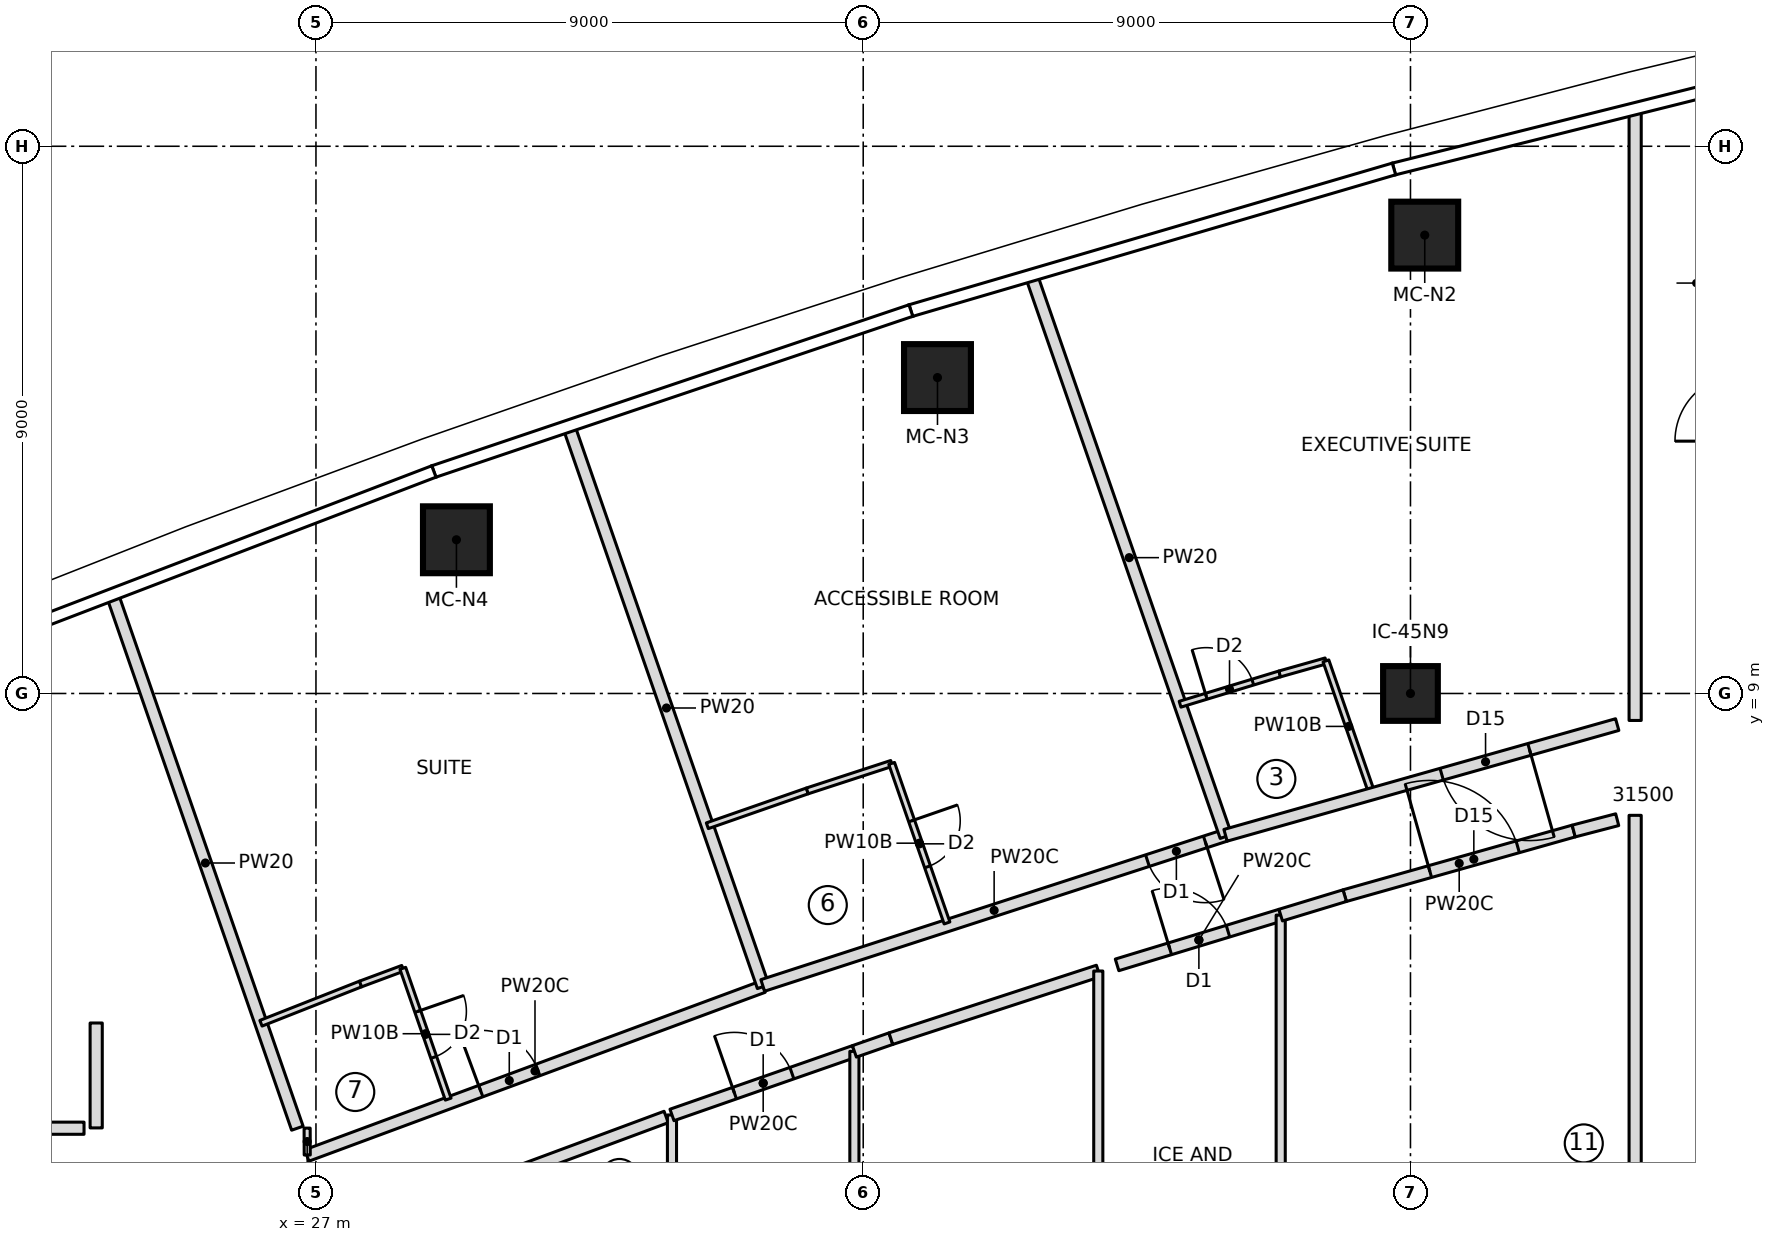
"""IFC4 building model, lengths in metres.
Left out: names, types, materials, properties, quantities, classifications, styles, units other than length and angle.
Written with IfcOpenShell. Run it as: python <this file> out.ifc"""

import sys

from ifc_helpers import new_model, si_unit, direction, frame, frame_2d, origin, origin_2d, place, context, subcontext, project, spatial, rectangle, extrude, element, fill, save


model = new_model("IFC4")
c1 = context("Model", 3, precision=1e-05, world=origin(), true_north=direction((0.0, 1.0)))
c2 = subcontext(c1, "Body", "Model", "MODEL_VIEW")
j1 = project(units=[si_unit("LENGTHUNIT", "METRE"), si_unit("PLANEANGLEUNIT", "RADIAN")], contexts=[c1])
p1 = place(None, origin())
s1 = spatial("IfcSite", under=j1, at=p1, CompositionType="ELEMENT")
p2 = place(p1, origin())
s2 = spatial("IfcBuilding", under=s1, at=p2, CompositionType="ELEMENT")
p3 = place(p2, frame((0.0, 0.0, 299.85)))
s3 = spatial("IfcBuildingStorey", under=s2, at=p3, CompositionType="ELEMENT", Elevation=299.85)
for number, where, z_axis, x_axis in (
    (1, (45.235, 16.539, 0.0), (0.0, 0.0, 1.0), (1.0, 0.0, 0.0)),
    (2, (37.221, 14.196, 0.0), (0.0, 0.0, 1.0), (1.0, 0.0, 0.0)),
    (3, (29.31, 11.528, 0.0), (0.0, 0.0, 1.0), (1.0, 0.0, 0.0)),
):
    element("IfcColumn", number, at=place(p3, frame(where, z_axis=z_axis, x_axis=x_axis)), inside=s3, PredefinedType="COLUMN", context=c2, shape_type="SweptSolid", body=[
        extrude(rectangle(XDim=1.1, YDim=1.1, at=origin_2d()), origin(), (0.0, 0.0, 1.0), 3.55),
    ])
p4 = place(p3, frame((45.0, 9.0, 0.0), z_axis=(0.0, 0.0, 1.0), x_axis=(1.0, 0.0, 0.0)))
e4 = element("IfcColumn", 4, at=p4, inside=s3, PredefinedType="COLUMN", context=c2, shape_type="SweptSolid", body=[
    extrude(rectangle(XDim=0.9, YDim=0.9, at=origin_2d()), origin(), (0.0, 0.0, 1.0), 3.55),
])
p5 = place(p3, frame((13.637, 1.85, 0.0), z_axis=(0.0, 0.0, 1.0), x_axis=(1.0, 0.0, 0.0)))
e5 = element("IfcWall", 5, at=p5, inside=s3, PredefinedType="PARTITIONING", context=c2, shape_type="SweptSolid", body=[
    extrude(rectangle(XDim=9.549, YDim=0.2, at=frame_2d((4.774, 0.0))), origin(), (0.0, 0.0, 1.0), 3.15),
])
p6 = place(p5, frame((4.274, 0.0, 0.0)))
e6 = element("IfcOpeningElement", 6, at=p6, cuts=e5, PredefinedType="OPENING", context=c2, shape_type="SweptSolid", body=[
    extrude(rectangle(XDim=1.0, YDim=2.1, at=frame_2d((0.5, 1.05))), frame((0.0, 0.11, 0.0), z_axis=(0.0, -1.0, 0.0), x_axis=(1.0, 0.0, 0.0)), (0.0, 0.0, 1.0), 0.22),
])
p7 = place(p3, frame((26.694, 1.85, 0.0), z_axis=(0.0, 0.0, 1.0), x_axis=(-0.327714422317, 0.944776829418, 0.0)))
e7 = element("IfcWall", 7, at=p7, inside=s3, PredefinedType="PARTITIONING", context=c2, shape_type="SweptSolid", body=[
    extrude(rectangle(XDim=9.233, YDim=0.2, at=frame_2d((4.617, 0.0))), origin(), (0.0, 0.0, 1.0), 3.15),
])
p8 = place(p3, frame((26.85, 1.401, 0.0), z_axis=(0.0, 0.0, 1.0), x_axis=(0.937815361849, 0.34713447982, 0.0)))
e8 = element("IfcWall", 8, at=p8, inside=s3, PredefinedType="PARTITIONING", context=c2, shape_type="SweptSolid", body=[
    extrude(rectangle(XDim=8.001, YDim=0.2, at=frame_2d((4.001, 0.0))), origin(), (0.0, 0.0, 1.0), 3.15),
])
p9 = place(p8, frame((3.05, 0.0, 0.0)))
e9 = element("IfcOpeningElement", 9, at=p9, cuts=e8, PredefinedType="OPENING", context=c2, shape_type="SweptSolid", body=[
    extrude(rectangle(XDim=1.0, YDim=2.1, at=frame_2d((0.5, 1.05))), frame((0.0, 0.11, 0.0), z_axis=(0.0, -1.0, 0.0), x_axis=(1.0, 0.0, 0.0)), (0.0, 0.0, 1.0), 0.22),
])
p10 = place(p3, frame((26.096, 3.576, 0.0), z_axis=(0.0, 0.0, 1.0), x_axis=(0.930254925629, 0.366913850028, 0.0)))
e10 = element("IfcWall", 10, at=p10, inside=s3, PredefinedType="PARTITIONING", context=c2, shape_type="SweptSolid", body=[
    extrude(rectangle(XDim=1.76, YDim=0.1, at=frame_2d((0.88, 0.0))), origin(), (0.0, 0.0, 1.0), 3.15),
])
p11 = place(p3, frame((27.733, 4.222, 0.0), z_axis=(0.0, 0.0, 1.0), x_axis=(0.937514267289, 0.347946833049, 0.0)))
e11 = element("IfcWall", 11, at=p11, inside=s3, PredefinedType="PARTITIONING", context=c2, shape_type="SweptSolid", body=[
    extrude(rectangle(XDim=0.742, YDim=0.1, at=frame_2d((0.371, 0.0))), origin(), (0.0, 0.0, 1.0), 3.15),
])
p12 = place(p3, frame((28.428, 4.48, 0.0), z_axis=(0.0, 0.0, 1.0), x_axis=(0.327718024288, -0.944775579996, 0.0)))
e12 = element("IfcWall", 12, at=p12, inside=s3, PredefinedType="PARTITIONING", context=c2, shape_type="SweptSolid", body=[
    extrude(rectangle(XDim=2.277, YDim=0.1, at=frame_2d((1.139, 0.0))), origin(), (0.0, 0.0, 1.0), 3.15),
])
p13 = place(p12, frame((0.75, 0.0, 0.0)))
e13 = element("IfcOpeningElement", 13, at=p13, cuts=e12, PredefinedType="OPENING", context=c2, shape_type="SweptSolid", body=[
    extrude(rectangle(XDim=0.8, YDim=2.1, at=frame_2d((0.4, 1.05))), frame((0.0, 0.06, 0.0), z_axis=(0.0, -1.0, 0.0), x_axis=(1.0, 0.0, 0.0)), (0.0, 0.0, 1.0), 0.12),
])
p14 = place(p3, frame((34.354, 4.179, 0.0), z_axis=(0.0, 0.0, 1.0), x_axis=(-0.327696596093, 0.944783012606, 0.0)))
e14 = element("IfcWall", 14, at=p14, inside=s3, PredefinedType="PARTITIONING", context=c2, shape_type="SweptSolid", body=[
    extrude(rectangle(XDim=9.7, YDim=0.2, at=frame_2d((4.85, 0.0))), origin(), (0.0, 0.0, 1.0), 3.15),
])
p15 = place(p3, frame((41.958, 6.667, 0.0), z_axis=(0.0, 0.0, 1.0), x_axis=(-0.95118530316, -0.308620347761, 0.0)))
e15 = element("IfcWall", 15, at=p15, inside=s3, PredefinedType="PARTITIONING", context=c2, shape_type="SweptSolid", body=[
    extrude(rectangle(XDim=8.002, YDim=0.2, at=frame_2d((4.001, 0.0))), origin(), (0.0, 0.0, 1.0), 3.15),
])
p16 = place(p15, frame((0.35, 0.0, 0.0)))
e16 = element("IfcOpeningElement", 16, at=p16, cuts=e15, PredefinedType="OPENING", context=c2, shape_type="SweptSolid", body=[
    extrude(rectangle(XDim=1.0, YDim=2.1, at=frame_2d((0.5, 1.05))), frame((0.0, 0.11, 0.0), z_axis=(0.0, -1.0, 0.0), x_axis=(1.0, 0.0, 0.0)), (0.0, 0.0, 1.0), 0.22),
])
p17 = place(p3, frame((33.437, 6.824, 0.0), z_axis=(0.0, 0.0, 1.0), x_axis=(0.944260018318, 0.329200573825, 0.0)))
e17 = element("IfcWall", 17, at=p17, inside=s3, PredefinedType="PARTITIONING", context=c2, shape_type="SweptSolid", body=[
    extrude(rectangle(XDim=1.74, YDim=0.1, at=frame_2d((0.87, 0.0))), origin(), (0.0, 0.0, 1.0), 3.15),
])
p18 = place(p3, frame((35.08, 7.397, 0.0), z_axis=(0.0, 0.0, 1.0), x_axis=(0.95070411494, 0.310099477322, 0.0)))
e18 = element("IfcWall", 18, at=p18, inside=s3, PredefinedType="PARTITIONING", context=c2, shape_type="SweptSolid", body=[
    extrude(rectangle(XDim=1.46, YDim=0.1, at=frame_2d((0.73, 0.0))), origin(), (0.0, 0.0, 1.0), 3.15),
])
p19 = place(p3, frame((36.468, 7.85, 0.0), z_axis=(0.0, 0.0, 1.0), x_axis=(0.327702248101, -0.944781052197, 0.0)))
e19 = element("IfcWall", 19, at=p19, inside=s3, PredefinedType="PARTITIONING", context=c2, shape_type="SweptSolid", body=[
    extrude(rectangle(XDim=2.777, YDim=0.1, at=frame_2d((1.389, 0.0))), origin(), (0.0, 0.0, 1.0), 3.15),
])
p20 = place(p19, frame((1.0, 0.0, 0.0)))
e20 = element("IfcOpeningElement", 20, at=p20, cuts=e19, PredefinedType="OPENING", context=c2, shape_type="SweptSolid", body=[
    extrude(rectangle(XDim=0.8, YDim=2.1, at=frame_2d((0.4, 1.05))), frame((0.0, 0.06, 0.0), z_axis=(0.0, -1.0, 0.0), x_axis=(1.0, 0.0, 0.0)), (0.0, 0.0, 1.0), 0.12),
])
p21 = place(p3, frame((41.965, 6.648, 0.0), z_axis=(0.0, 0.0, 1.0), x_axis=(-0.327710853631, 0.944778067279, 0.0)))
e21 = element("IfcWall", 21, at=p21, inside=s3, PredefinedType="PARTITIONING", context=c2, shape_type="SweptSolid", body=[
    extrude(rectangle(XDim=9.707, YDim=0.2, at=frame_2d((4.854, 0.0))), origin(), (0.0, 0.0, 1.0), 3.15),
])
p22 = place(p3, frame((41.211, 8.823, 0.0), z_axis=(0.0, 0.0, 1.0), x_axis=(0.95674463014, 0.290929050971, 0.0)))
e22 = element("IfcWall", 22, at=p22, inside=s3, PredefinedType="PARTITIONING", context=c2, shape_type="SweptSolid", body=[
    extrude(rectangle(XDim=1.713, YDim=0.1, at=frame_2d((0.856, 0.0))), origin(), (0.0, 0.0, 1.0), 3.15),
])
p23 = place(p22, frame((0.45, 0.0, 0.0)))
e23 = element("IfcOpeningElement", 23, at=p23, cuts=e22, PredefinedType="OPENING", context=c2, shape_type="SweptSolid", body=[
    extrude(rectangle(XDim=0.8, YDim=2.1, at=frame_2d((0.4, 1.05))), frame((0.0, 0.06, 0.0), z_axis=(0.0, -1.0, 0.0), x_axis=(1.0, 0.0, 0.0)), (0.0, 0.0, 1.0), 0.12),
])
p24 = place(p3, frame((42.85, 9.321, 0.0), z_axis=(0.0, 0.0, 1.0), x_axis=(0.962370937031, 0.271739175603, 0.0)))
e24 = element("IfcWall", 24, at=p24, inside=s3, PredefinedType="PARTITIONING", context=c2, shape_type="SweptSolid", body=[
    extrude(rectangle(XDim=0.79, YDim=0.1, at=frame_2d((0.395, 0.0))), origin(), (0.0, 0.0, 1.0), 3.15),
])
p25 = place(p3, frame((43.61, 9.536, 0.0), z_axis=(0.0, 0.0, 1.0), x_axis=(0.32773175909, -0.944770815639, 0.0)))
e25 = element("IfcWall", 25, at=p25, inside=s3, PredefinedType="PARTITIONING", context=c2, shape_type="SweptSolid", body=[
    extrude(rectangle(XDim=2.281, YDim=0.1, at=frame_2d((1.141, 0.0))), origin(), (0.0, 0.0, 1.0), 3.15),
])
p26 = place(p3, frame((29.092, 0.673, 0.0), z_axis=(0.0, 0.0, 1.0), x_axis=(0.937460178932, 0.348092534992, 0.0)))
e26 = element("IfcWall", 26, at=p26, inside=s3, PredefinedType="PARTITIONING", context=c2, shape_type="SweptSolid", body=[
    extrude(rectangle(XDim=3.913, YDim=0.2, at=frame_2d((1.957, 0.0))), origin(), (0.0, 0.0, 1.0), 3.15),
])
p27 = place(p3, frame((32.855, -2.068, 0.0), z_axis=(0.0, 0.0, 1.0), x_axis=(0.0, 1.0, 0.0)))
e27 = element("IfcWall", 27, at=p27, inside=s3, PredefinedType="PARTITIONING", context=c2, shape_type="SweptSolid", body=[
    extrude(rectangle(XDim=4.136, YDim=0.15, at=frame_2d((2.068, 0.0))), origin(), (0.0, 0.0, 1.0), 3.15),
])
p28 = place(p3, frame((32.855, 2.068, 0.0), z_axis=(0.0, 0.0, 1.0), x_axis=(0.944260188635, 0.329200085296, 0.0)))
e28 = element("IfcWall", 28, at=p28, inside=s3, PredefinedType="PARTITIONING", context=c2, shape_type="SweptSolid", body=[
    extrude(rectangle(XDim=3.177, YDim=0.2, at=frame_2d((1.588, 0.0))), origin(), (0.0, 0.0, 1.0), 3.15),
])
p29 = place(p28, frame((1.088, 0.0, 0.0)))
e29 = element("IfcOpeningElement", 29, at=p29, cuts=e28, PredefinedType="OPENING", context=c2, shape_type="SweptSolid", body=[
    extrude(rectangle(XDim=1.0, YDim=2.1, at=frame_2d((0.5, 1.05))), frame((0.0, 0.11, 0.0), z_axis=(0.0, -1.0, 0.0), x_axis=(1.0, 0.0, 0.0)), (0.0, 0.0, 1.0), 0.22),
])
p30 = place(p3, frame((35.855, -3.114, 0.0), z_axis=(0.0, 0.0, 1.0), x_axis=(0.0, 1.0, 0.0)))
e30 = element("IfcWall", 30, at=p30, inside=s3, PredefinedType="PARTITIONING", context=c2, shape_type="SweptSolid", body=[
    extrude(rectangle(XDim=6.228, YDim=0.15, at=frame_2d((3.114, 0.0))), origin(), (0.0, 0.0, 1.0), 3.15),
])
p31 = place(p3, frame((35.855, 3.114, 0.0), z_axis=(0.0, 0.0, 1.0), x_axis=(0.944289130413, 0.329117058483, 0.0)))
e31 = element("IfcWall", 31, at=p31, inside=s3, PredefinedType="PARTITIONING", context=c2, shape_type="SweptSolid", body=[
    extrude(rectangle(XDim=0.635, YDim=0.2, at=frame_2d((0.317, 0.0))), origin(), (0.0, 0.0, 1.0), 3.15),
])
p32 = place(p3, frame((36.455, 3.323, 0.0), z_axis=(0.0, 0.0, 1.0), x_axis=(0.950718067733, 0.310056697535, 0.0)))
e32 = element("IfcWall", 32, at=p32, inside=s3, PredefinedType="PARTITIONING", context=c2, shape_type="SweptSolid", body=[
    extrude(rectangle(XDim=3.588, YDim=0.2, at=frame_2d((1.794, 0.0))), origin(), (0.0, 0.0, 1.0), 3.15),
])
p33 = place(p3, frame((39.866, -4.435, 0.0), z_axis=(0.0, 0.0, 1.0), x_axis=(0.0, 1.0, 0.0)))
e33 = element("IfcWall", 33, at=p33, inside=s3, PredefinedType="PARTITIONING", context=c2, shape_type="SweptSolid", body=[
    extrude(rectangle(XDim=8.871, YDim=0.15, at=frame_2d((4.435, 0.0))), origin(), (0.0, 0.0, 1.0), 3.15),
])
p34 = place(p3, frame((40.175, 4.536, 0.0), z_axis=(0.0, 0.0, 1.0), x_axis=(0.956742178936, 0.290937111838, 0.0)))
e34 = element("IfcWall", 34, at=p34, inside=s3, PredefinedType="PARTITIONING", context=c2, shape_type="SweptSolid", body=[
    extrude(rectangle(XDim=2.813, YDim=0.2, at=frame_2d((1.406, 0.0))), origin(), (0.0, 0.0, 1.0), 3.15),
])
p35 = place(p34, frame((0.906, 0.0, 0.0)))
e35 = element("IfcOpeningElement", 35, at=p35, cuts=e34, PredefinedType="OPENING", context=c2, shape_type="SweptSolid", body=[
    extrude(rectangle(XDim=1.0, YDim=2.1, at=frame_2d((0.5, 1.05))), frame((0.0, 0.11, 0.0), z_axis=(0.0, -1.0, 0.0), x_axis=(1.0, 0.0, 0.0)), (0.0, 0.0, 1.0), 0.22),
])
p36 = place(p3, frame((42.866, -5.354, 0.0), z_axis=(0.0, 0.0, 1.0), x_axis=(0.0, 1.0, 0.0)))
e36 = element("IfcWall", 36, at=p36, inside=s3, PredefinedType="PARTITIONING", context=c2, shape_type="SweptSolid", body=[
    extrude(rectangle(XDim=10.709, YDim=0.15, at=frame_2d((5.354, 0.0))), origin(), (0.0, 0.0, 1.0), 3.15),
])
p37 = place(p3, frame((43.918, 5.675, 0.0), z_axis=(0.0, 0.0, 1.0), x_axis=(0.962411212211, 0.271596499628, 0.0)))
e37 = element("IfcWall", 37, at=p37, inside=s3, PredefinedType="PARTITIONING", context=c2, shape_type="SweptSolid", body=[
    extrude(rectangle(XDim=3.913, YDim=0.2, at=frame_2d((1.957, 0.0))), origin(), (0.0, 0.0, 1.0), 3.15),
])
p38 = place(p37, frame((1.457, 0.0, 0.0)))
e38 = element("IfcOpeningElement", 38, at=p38, cuts=e37, PredefinedType="OPENING", context=c2, shape_type="SweptSolid", body=[
    extrude(rectangle(XDim=1.5, YDim=2.1, at=frame_2d((0.75, 1.05))), frame((0.0, 0.11, 0.0), z_axis=(0.0, -1.0, 0.0), x_axis=(1.0, 0.0, 0.0)), (0.0, 0.0, 1.0), 0.22),
])
p39 = place(p3, frame((42.866, 5.354, 0.0), z_axis=(0.0, 0.0, 1.0), x_axis=(0.956676567943, 0.291152785233, 0.0)))
e39 = element("IfcWall", 39, at=p39, inside=s3, PredefinedType="PARTITIONING", context=c2, shape_type="SweptSolid", body=[
    extrude(rectangle(XDim=1.1, YDim=0.2, at=frame_2d((0.55, 0.0))), origin(), (0.0, 0.0, 1.0), 3.15),
])
p40 = place(p3, frame((26.856, 1.409, 0.0), z_axis=(0.0, 0.0, 1.0), x_axis=(-0.003863105832, 0.999992538179, 0.0)))
e40 = element("IfcWall", 40, at=p40, inside=s3, PredefinedType="PARTITIONING", context=c2, shape_type="SweptSolid", body=[
    extrude(rectangle(XDim=0.442, YDim=0.1, at=frame_2d((0.221, 0.0))), origin(), (0.0, 0.0, 1.0), 3.15),
])
p41 = place(p3, frame((48.4, 8.488, 0.0), z_axis=(0.0, 0.0, 1.0), x_axis=(-0.962293631271, -0.272012807081, 0.0)))
e41 = element("IfcWall", 41, at=p41, inside=s3, PredefinedType="PARTITIONING", context=c2, shape_type="SweptSolid", body=[
    extrude(rectangle(XDim=6.694, YDim=0.2, at=frame_2d((3.347, 0.0))), origin(), (0.0, 0.0, 1.0), 3.15),
])
p42 = place(p41, frame((1.5, 0.0, 0.0)))
e42 = element("IfcOpeningElement", 42, at=p42, cuts=e41, PredefinedType="OPENING", context=c2, shape_type="SweptSolid", body=[
    extrude(rectangle(XDim=1.5, YDim=2.1, at=frame_2d((0.75, 1.05))), frame((0.0, 0.11, 0.0), z_axis=(0.0, -1.0, 0.0), x_axis=(1.0, 0.0, 0.0)), (0.0, 0.0, 1.0), 0.22),
])
p43 = place(p3, frame((47.684, 6.738, 0.0), z_axis=(0.0, 0.0, 1.0), x_axis=(0.967585713416, 0.252542842294, 0.0)))
e43 = element("IfcWall", 43, at=p43, inside=s3, PredefinedType="PARTITIONING", context=c2, shape_type="SweptSolid", body=[
    extrude(rectangle(XDim=0.74, YDim=0.2, at=frame_2d((0.37, 0.0))), origin(), (0.0, 0.0, 1.0), 3.15),
])
p44 = place(p3, frame((48.695, 6.996, 0.0), z_axis=(0.0, 0.0, 1.0), x_axis=(0.0, -1.0, 0.0)))
e44 = element("IfcWall", 44, at=p44, inside=s3, PredefinedType="PARTITIONING", context=c2, shape_type="SweptSolid", body=[
    extrude(rectangle(XDim=13.992, YDim=0.2, at=frame_2d((6.996, 0.0))), origin(), (0.0, 0.0, 1.0), 3.15),
])
p45 = place(p3, frame((23.386, 3.58, 0.0), z_axis=(0.0, 0.0, 1.0), x_axis=(0.0, -1.0, 0.0)))
e45 = element("IfcWall", 45, at=p45, inside=s3, PredefinedType="PARTITIONING", context=c2, shape_type="SweptSolid", body=[
    extrude(rectangle(XDim=1.725, YDim=0.2, at=frame_2d((0.863, 0.0))), origin(), (0.0, 0.0, 1.0), 3.15),
])
p46 = place(p3, frame((48.695, 18.553, 0.0), z_axis=(0.0, 0.0, 1.0), x_axis=(0.0, -1.0, 0.0)))
e46 = element("IfcWall", 46, at=p46, inside=s3, PredefinedType="PARTITIONING", context=c2, shape_type="SweptSolid", body=[
    extrude(rectangle(XDim=9.997, YDim=0.2, at=frame_2d((4.998, 0.0))), origin(), (0.0, 0.0, 1.0), 3.15),
])
p47 = place(p13, origin())
e47 = element("IfcDoor", 47, at=p47, inside=s3, OperationType="SINGLE_SWING_LEFT", PredefinedType="DOOR", context=c2, shape_type="SweptSolid", body=[
    extrude(rectangle(XDim=0.8, YDim=2.1, at=frame_2d((0.4, 1.05))), frame((0.0, 0.025, 0.0), z_axis=(0.0, -1.0, 0.0), x_axis=(1.0, 0.0, 0.0)), (0.0, 0.0, 1.0), 0.05),
])
fill(e13, e47)
p48 = place(p9, origin())
e48 = element("IfcDoor", 48, at=p48, inside=s3, OperationType="SINGLE_SWING_LEFT", PredefinedType="DOOR", context=c2, shape_type="SweptSolid", body=[
    extrude(rectangle(XDim=1.0, YDim=2.1, at=frame_2d((0.5, 1.05))), frame((0.0, 0.025, 0.0), z_axis=(0.0, -1.0, 0.0), x_axis=(1.0, 0.0, 0.0)), (0.0, 0.0, 1.0), 0.05),
])
fill(e9, e48)
p49 = place(p20, origin())
e49 = element("IfcDoor", 49, at=p49, inside=s3, OperationType="SINGLE_SWING_LEFT", PredefinedType="DOOR", context=c2, shape_type="SweptSolid", body=[
    extrude(rectangle(XDim=0.8, YDim=2.1, at=frame_2d((0.4, 1.05))), frame((0.0, 0.025, 0.0), z_axis=(0.0, -1.0, 0.0), x_axis=(1.0, 0.0, 0.0)), (0.0, 0.0, 1.0), 0.05),
])
fill(e20, e49)
p50 = place(p16, origin())
e50 = element("IfcDoor", 50, at=p50, inside=s3, OperationType="SINGLE_SWING_LEFT", PredefinedType="DOOR", context=c2, shape_type="SweptSolid", body=[
    extrude(rectangle(XDim=1.0, YDim=2.1, at=frame_2d((0.5, 1.05))), frame((0.0, 0.025, 0.0), z_axis=(0.0, -1.0, 0.0), x_axis=(1.0, 0.0, 0.0)), (0.0, 0.0, 1.0), 0.05),
])
fill(e16, e50)
p51 = place(p23, origin())
e51 = element("IfcDoor", 51, at=p51, inside=s3, OperationType="SINGLE_SWING_LEFT", PredefinedType="DOOR", context=c2, shape_type="SweptSolid", body=[
    extrude(rectangle(XDim=0.8, YDim=2.1, at=frame_2d((0.4, 1.05))), frame((0.0, 0.025, 0.0), z_axis=(0.0, -1.0, 0.0), x_axis=(1.0, 0.0, 0.0)), (0.0, 0.0, 1.0), 0.05),
])
fill(e23, e51)
p52 = place(p42, origin())
e52 = element("IfcDoor", 52, at=p52, inside=s3, OperationType="DOUBLE_DOOR_SINGLE_SWING", PredefinedType="DOOR", context=c2, shape_type="SweptSolid", body=[
    extrude(rectangle(XDim=1.5, YDim=2.1, at=frame_2d((0.75, 1.05))), frame((0.0, 0.025, 0.0), z_axis=(0.0, -1.0, 0.0), x_axis=(1.0, 0.0, 0.0)), (0.0, 0.0, 1.0), 0.05),
])
fill(e42, e52)
p53 = place(p29, origin())
e53 = element("IfcDoor", 53, at=p53, inside=s3, OperationType="SINGLE_SWING_LEFT", PredefinedType="DOOR", context=c2, shape_type="SweptSolid", body=[
    extrude(rectangle(XDim=1.0, YDim=2.1, at=frame_2d((0.5, 1.05))), frame((0.0, 0.025, 0.0), z_axis=(0.0, -1.0, 0.0), x_axis=(1.0, 0.0, 0.0)), (0.0, 0.0, 1.0), 0.05),
])
fill(e29, e53)
p54 = place(p35, origin())
e54 = element("IfcDoor", 54, at=p54, inside=s3, OperationType="SINGLE_SWING_LEFT", PredefinedType="DOOR", context=c2, shape_type="SweptSolid", body=[
    extrude(rectangle(XDim=1.0, YDim=2.1, at=frame_2d((0.5, 1.05))), frame((0.0, 0.025, 0.0), z_axis=(0.0, -1.0, 0.0), x_axis=(1.0, 0.0, 0.0)), (0.0, 0.0, 1.0), 0.05),
])
fill(e35, e54)
p55 = place(p38, origin())
e55 = element("IfcDoor", 55, at=p55, inside=s3, OperationType="DOUBLE_DOOR_SINGLE_SWING", PredefinedType="DOOR", context=c2, shape_type="SweptSolid", body=[
    extrude(rectangle(XDim=1.5, YDim=2.1, at=frame_2d((0.75, 1.05))), frame((0.0, 0.025, 0.0), z_axis=(0.0, -1.0, 0.0), x_axis=(1.0, 0.0, 0.0)), (0.0, 0.0, 1.0), 0.05),
])
fill(e38, e55)
save(model, sys.argv[1])
